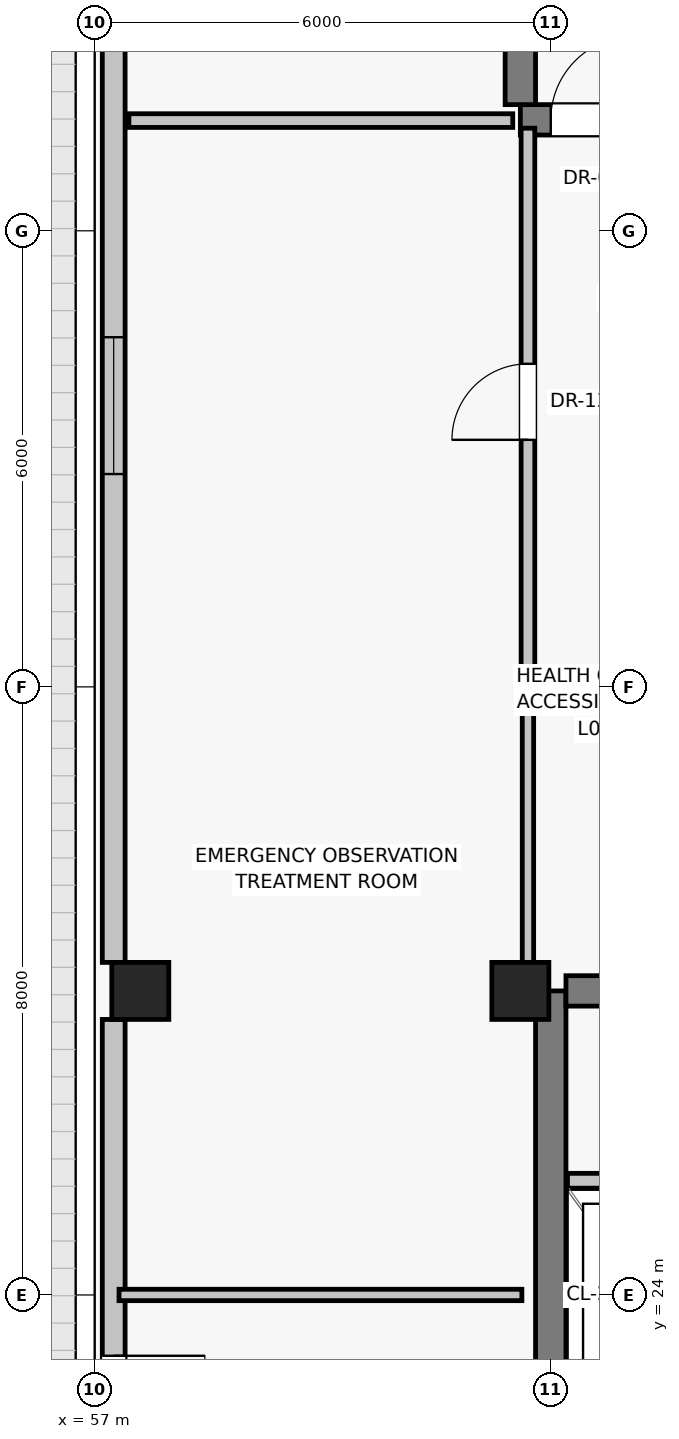
"""IFC4 building model, lengths in metres.
Left out: names, types, materials, properties, quantities, classifications, styles, units other than length and angle.
Written with IfcOpenShell. Run it as: python <this file> out.ifc"""

import sys

from ifc_helpers import new_model, si_unit, direction, frame, frame_2d, origin, origin_2d, place, context, subcontext, project, spatial, rectangle, extrude, source, transform, mapped, element, fill, save


model = new_model("IFC4")
c1 = context("Model", 3, precision=1e-05, world=origin(), true_north=direction((0.0, 1.0)))
c2 = subcontext(c1, "Body", "Model", "MODEL_VIEW")
j1 = project(units=[si_unit("LENGTHUNIT", "METRE"), si_unit("PLANEANGLEUNIT", "RADIAN")], contexts=[c1])
p1 = place(None, origin())
s1 = spatial("IfcSite", under=j1, at=p1, CompositionType="ELEMENT")
p2 = place(p1, origin())
s2 = spatial("IfcBuilding", under=s1, at=p2, CompositionType="ELEMENT")
p3 = place(p2, origin())
s3 = spatial("IfcBuildingStorey", under=s2, at=p3, CompositionType="ELEMENT", Elevation=0.0)
for number, where, z_axis, x_axis in (
    (1, (57.6, 28.0, 0.0), (0.0, 0.0, 1.0), (1.0, 0.0, 0.0)),
    (2, (62.6, 28.0, 0.0), (0.0, 0.0, 1.0), (1.0, 0.0, 0.0)),
):
    element("IfcColumn", number, at=place(p3, frame(where, z_axis=z_axis, x_axis=x_axis)), inside=s3, PredefinedType="COLUMN", context=c2, shape_type="SweptSolid", body=[
        extrude(rectangle(XDim=0.75, YDim=0.75, at=origin_2d()), origin(), (0.0, 0.0, 1.0), 5.2),
    ])
p4 = place(p3, frame((57.25, 43.6, 0.0), z_axis=(0.0, 0.0, 1.0), x_axis=(0.0, -1.0, 0.0)))
e3 = element("IfcWall", 3, at=p4, inside=s3, PredefinedType="SOLIDWALL", context=c2, shape_type="SweptSolid", body=[
    extrude(rectangle(XDim=15.225, YDim=0.3, at=frame_2d((7.613, 0.0))), origin(), (0.0, 0.0, 1.0), 4.15),
])
p5 = place(p4, frame((7.0, 0.0, 0.85)))
e4 = element("IfcOpeningElement", 4, at=p5, cuts=e3, PredefinedType="OPENING", context=c2, shape_type="SweptSolid", body=[
    extrude(rectangle(XDim=1.8, YDim=1.65, at=frame_2d((0.9, 0.825))), frame((0.0, 0.16, 0.0), z_axis=(0.0, -1.0, 0.0), x_axis=(1.0, 0.0, 0.0)), (0.0, 0.0, 1.0), 0.32),
])
p6 = place(p3, frame((57.25, 27.625, 0.0), z_axis=(0.0, 0.0, 1.0), x_axis=(0.0, -1.0, 0.0)))
e5 = element("IfcWall", 5, at=p6, inside=s3, PredefinedType="SOLIDWALL", context=c2, shape_type="SweptSolid", body=[
    extrude(rectangle(XDim=11.25, YDim=0.3, at=frame_2d((5.625, 0.0))), origin(), (0.0, 0.0, 1.0), 4.15),
])
p7 = place(p6, frame((4.425, 0.0, 0.0)))
e6 = element("IfcOpeningElement", 6, at=p7, cuts=e5, PredefinedType="OPENING", context=c2, shape_type="SweptSolid", body=[
    extrude(rectangle(XDim=2.4, YDim=2.5, at=frame_2d((1.2, 1.25))), frame((0.0, 0.16, 0.0), z_axis=(0.0, -1.0, 0.0), x_axis=(1.0, 0.0, 0.0)), (0.0, 0.0, 1.0), 0.32),
])
p8 = place(p3, frame((63.0, 16.0, 0.0), z_axis=(0.0, 0.0, 1.0), x_axis=(0.0, 1.0, 0.0)))
e7 = element("IfcWall", 7, at=p8, inside=s3, PredefinedType="SHEAR", context=c2, shape_type="SweptSolid", body=[
    extrude(rectangle(XDim=12.0, YDim=0.4, at=frame_2d((6.0, 0.0))), origin(), (0.0, 0.0, 1.0), 4.9),
])
p9 = place(p3, frame((63.2, 28.0, 0.0), z_axis=(0.0, 0.0, 1.0), x_axis=(1.0, 0.0, 0.0)))
e8 = element("IfcWall", 8, at=p9, inside=s3, PredefinedType="SHEAR", context=c2, shape_type="SweptSolid", body=[
    extrude(rectangle(XDim=1.95, YDim=0.4, at=frame_2d((0.975, 0.0))), origin(), (0.0, 0.0, 1.0), 4.9),
])
p10 = place(p3, frame((63.22, 25.5, 0.0), z_axis=(0.0, 0.0, 1.0), x_axis=(1.0, 0.0, 0.0)))
e9 = element("IfcWall", 9, at=p10, inside=s3, PredefinedType="SOLIDWALL", context=c2, shape_type="SweptSolid", body=[
    extrude(rectangle(XDim=1.91, YDim=0.2, at=frame_2d((0.955, 0.0))), origin(), (0.0, 0.0, 1.0), 4.9),
])
p11 = place(p3, frame((62.6, 39.46, 0.0), z_axis=(0.0, 0.0, 1.0), x_axis=(1.0, 0.0, 0.0)))
e10 = element("IfcWall", 10, at=p11, inside=s3, PredefinedType="SHEAR", context=c2, shape_type="SweptSolid", body=[
    extrude(rectangle(XDim=10.0, YDim=0.4, at=frame_2d((5.0, 0.0))), origin(), (0.0, 0.0, 1.0), 4.9),
])
p12 = place(p11, frame((0.4, 0.0, 0.0)))
e11 = element("IfcOpeningElement", 11, at=p12, cuts=e10, PredefinedType="OPENING", context=c2, shape_type="SweptSolid", body=[
    extrude(rectangle(XDim=1.1, YDim=2.03, at=frame_2d((0.55, 1.015))), frame((0.0, 0.21, 0.0), z_axis=(0.0, -1.0, 0.0), x_axis=(1.0, 0.0, 0.0)), (0.0, 0.0, 1.0), 0.42),
])
p13 = place(p3, frame((62.6, 39.66, 0.0), z_axis=(0.0, 0.0, 1.0), x_axis=(0.0, 1.0, 0.0)))
e12 = element("IfcWall", 12, at=p13, inside=s3, PredefinedType="SHEAR", context=c2, shape_type="SweptSolid", body=[
    extrude(rectangle(XDim=3.05, YDim=0.4, at=frame_2d((1.525, 0.0))), origin(), (0.0, 0.0, 1.0), 4.9),
])
p14 = place(p3, frame((57.45, 39.45, 0.0), z_axis=(0.0, 0.0, 1.0), x_axis=(1.0, 0.0, 0.0)))
e13 = element("IfcWall", 13, at=p14, inside=s3, PredefinedType="PARTITIONING", context=c2, shape_type="SweptSolid", body=[
    extrude(rectangle(XDim=5.05, YDim=0.18, at=frame_2d((2.525, 0.0))), origin(), (0.0, 0.0, 1.0), 4.9),
])
p15 = place(p3, frame((62.8, 32.1, 0.0), z_axis=(0.0, 0.0, 1.0), x_axis=(1.0, 0.0, 0.0)))
e14 = element("IfcWall", 14, at=p15, inside=s3, PredefinedType="PARTITIONING", context=c2, shape_type="SweptSolid", body=[
    extrude(rectangle(XDim=2.5, YDim=0.15, at=frame_2d((1.25, 0.0))), origin(), (0.0, 0.0, 1.0), 4.9),
])
p16 = place(p3, frame((62.7, 28.2, 0.0), z_axis=(0.0, 0.0, 1.0), x_axis=(0.0, 1.0, 0.0)))
e15 = element("IfcWall", 15, at=p16, inside=s3, PredefinedType="PARTITIONING", context=c2, shape_type="SweptSolid", body=[
    extrude(rectangle(XDim=3.8, YDim=0.15, at=frame_2d((1.9, 0.0))), origin(), (0.0, 0.0, 1.0), 4.3),
])
p17 = place(p3, frame((62.7, 32.25, 0.0), z_axis=(0.0, 0.0, 1.0), x_axis=(0.0, 1.0, 0.0)))
e16 = element("IfcWall", 16, at=p17, inside=s3, PredefinedType="PARTITIONING", context=c2, shape_type="SweptSolid", body=[
    extrude(rectangle(XDim=7.1, YDim=0.18, at=frame_2d((3.55, 0.0))), origin(), (0.0, 0.0, 1.0), 4.3),
])
p18 = place(p17, frame((3.0, 0.0, 0.0)))
e17 = element("IfcOpeningElement", 17, at=p18, cuts=e16, PredefinedType="OPENING", context=c2, shape_type="SweptSolid", body=[
    extrude(rectangle(XDim=1.0, YDim=2.01, at=frame_2d((0.5, 1.005))), frame((0.0, 0.1, 0.0), z_axis=(0.0, -1.0, 0.0), x_axis=(1.0, 0.0, 0.0)), (0.0, 0.0, 1.0), 0.2),
])
p19 = place(p3, frame((57.32, 24.0, 0.0), z_axis=(0.0, 0.0, 1.0), x_axis=(1.0, 0.0, 0.0)))
e18 = element("IfcWall", 18, at=p19, inside=s3, PredefinedType="PARTITIONING", context=c2, shape_type="SweptSolid", body=[
    extrude(rectangle(XDim=5.3, YDim=0.15, at=frame_2d((2.65, 0.0))), origin(), (0.0, 0.0, 1.0), 4.9),
])
m1 = source(origin(), c2, "Body", "SweptSolid", [
    extrude(rectangle(XDim=1.8, YDim=1.65, at=frame_2d((0.9, 0.825))), frame((0.0, 0.03, 0.0), z_axis=(0.0, -1.0, 0.0), x_axis=(1.0, 0.0, 0.0)), (0.0, 0.0, 1.0), 0.06),
])
p20 = place(p5, origin())
e19 = element("IfcWindow", 19, at=p20, inside=s3, PartitioningType="DOUBLE_PANEL_VERTICAL", PredefinedType="WINDOW", context=c2, shape_type="MappedRepresentation", body=[
    mapped(m1, transform((0.0, 0.0, 0.0), scale=1.0)),
])
fill(e4, e19)
m2 = source(origin(), c2, "Body", "SweptSolid", [
    extrude(rectangle(XDim=2.4, YDim=2.5, at=frame_2d((1.2, 1.25))), frame((0.0, 0.025, 0.0), z_axis=(0.0, -1.0, 0.0), x_axis=(1.0, 0.0, 0.0)), (0.0, 0.0, 1.0), 0.05),
])
p21 = place(p7, frame((2.4, 0.0, 0.0), z_axis=(0.0, 0.0, 1.0), x_axis=(-1.0, 0.0, 0.0)))
e20 = element("IfcDoor", 20, at=p21, inside=s3, OperationType="DOUBLE_SWING_LEFT", PredefinedType="DOOR", context=c2, shape_type="MappedRepresentation", body=[
    mapped(m2, transform((0.0, 0.0, 0.0), scale=1.0)),
])
fill(e6, e20)
m3 = source(origin(), c2, "Body", "SweptSolid", [
    extrude(rectangle(XDim=1.1, YDim=2.03, at=frame_2d((0.55, 1.015))), frame((0.0, 0.025, 0.0), z_axis=(0.0, -1.0, 0.0), x_axis=(1.0, 0.0, 0.0)), (0.0, 0.0, 1.0), 0.05),
])
p22 = place(p12, origin())
e21 = element("IfcDoor", 21, at=p22, inside=s3, OperationType="SINGLE_SWING_RIGHT", PredefinedType="DOOR", context=c2, shape_type="MappedRepresentation", body=[
    mapped(m3, transform((0.0, 0.0, 0.0), scale=1.0)),
])
fill(e11, e21)
m4 = source(origin(), c2, "Body", "SweptSolid", [
    extrude(rectangle(XDim=1.0, YDim=2.01, at=frame_2d((0.5, 1.005))), frame((0.0, 0.025, 0.0), z_axis=(0.0, -1.0, 0.0), x_axis=(1.0, 0.0, 0.0)), (0.0, 0.0, 1.0), 0.05),
])
p23 = place(p18, origin())
e22 = element("IfcDoor", 22, at=p23, inside=s3, OperationType="SINGLE_SWING_LEFT", PredefinedType="DOOR", context=c2, shape_type="MappedRepresentation", body=[
    mapped(m4, transform((0.0, 0.0, 0.0), scale=1.0)),
])
fill(e17, e22)
save(model, sys.argv[1])
